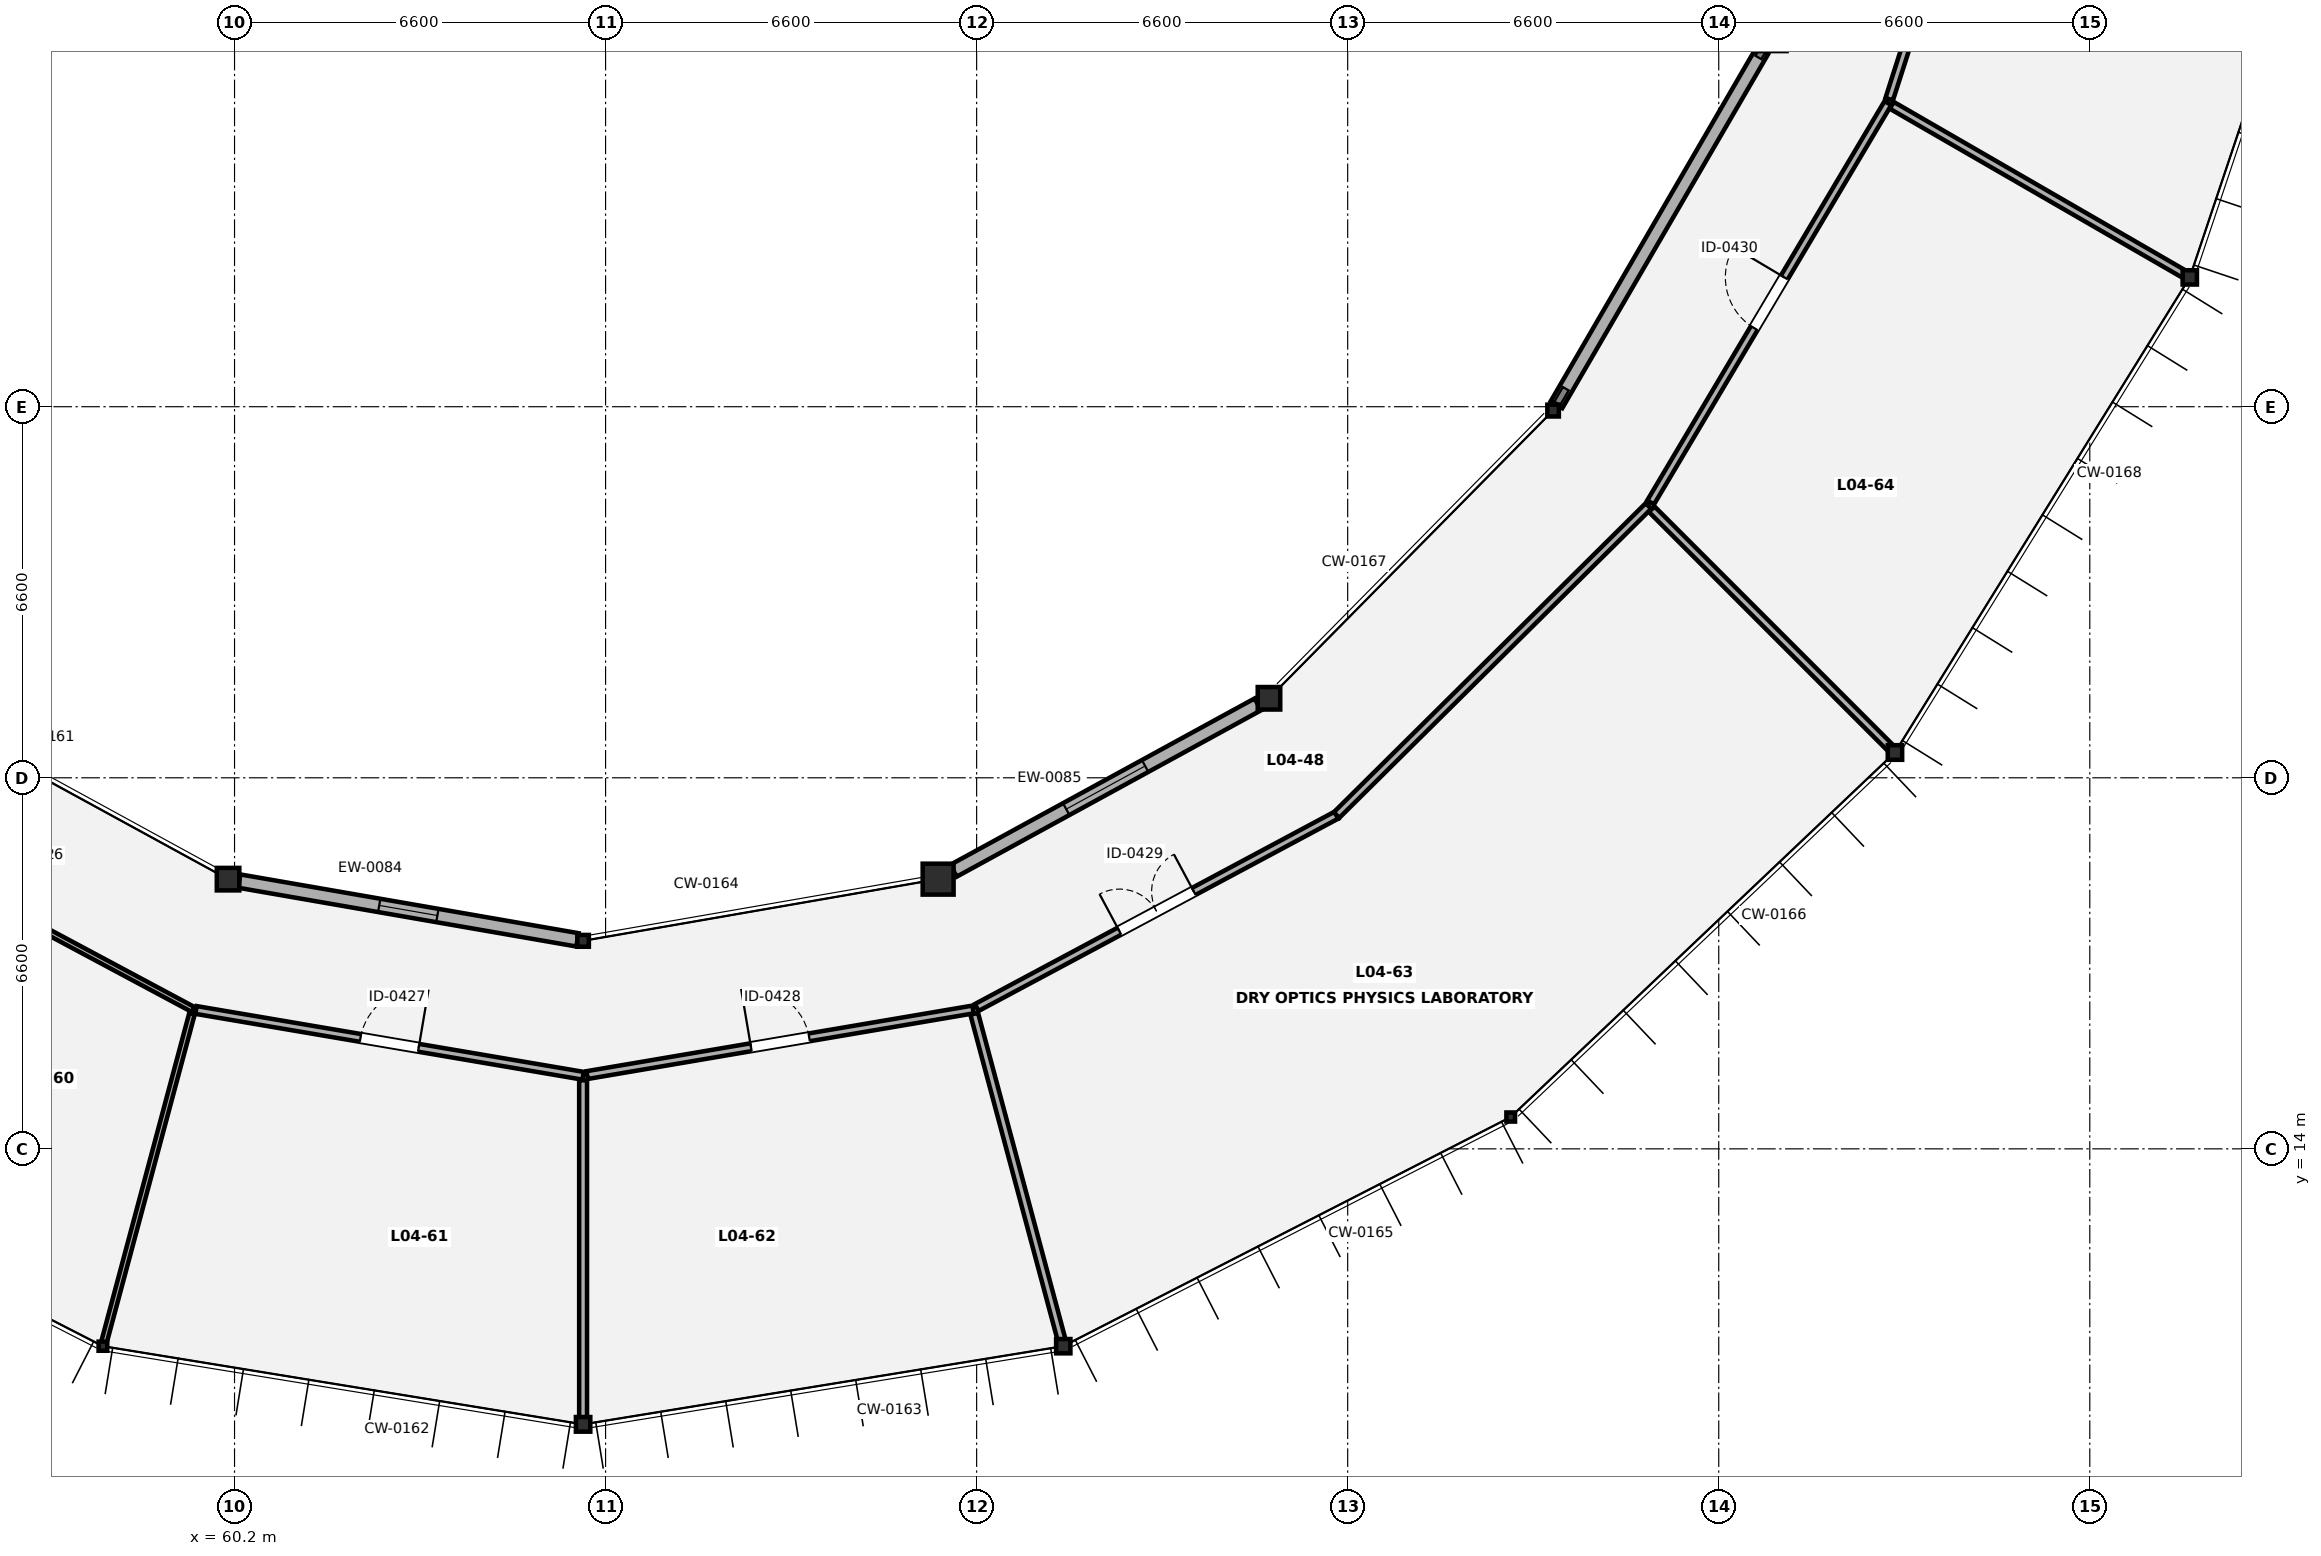
"""IFC4 building model, lengths in metres.
Left out: names, types, materials, properties, quantities, classifications, styles, units other than length and angle.
Written with IfcOpenShell. Run it as: python <this file> out.ifc"""

import sys

from ifc_helpers import new_model, si_unit, direction, frame, frame_2d, origin, origin_2d, place, context, subcontext, project, spatial, rectangle, i_section, extrude, element, fill, save


model = new_model("IFC4")
c1 = context("Model", 3, precision=1e-05, world=origin(), true_north=direction((0.0, 1.0)))
c2 = subcontext(c1, "Body", "Model", "MODEL_VIEW")
j1 = project(units=[si_unit("LENGTHUNIT", "METRE"), si_unit("PLANEANGLEUNIT", "RADIAN")], contexts=[c1])
p1 = place(None, origin())
s1 = spatial("IfcSite", under=j1, at=p1, CompositionType="ELEMENT")
p2 = place(p1, origin())
s2 = spatial("IfcBuilding", under=s1, at=p2, CompositionType="ELEMENT")
p3 = place(p2, frame((0.0, 0.0, 17.5)))
s3 = spatial("IfcBuildingStorey", under=s2, at=p3, CompositionType="ELEMENT", Elevation=17.5)
p4 = place(p3, frame((57.859, 10.49, 0.0), z_axis=(0.0, 0.0, 1.0), x_axis=(1.0, 0.0, 0.0)))
e1 = element("IfcColumn", 1, at=p4, inside=s3, PredefinedType="COLUMN", context=c2, shape_type="SweptSolid", body=[
    extrude(i_section(OverallWidth=0.154, OverallDepth=0.162, WebThickness=0.008, FlangeThickness=0.011, FilletRadius=0.009, at=origin_2d()), origin(), (0.0, 0.0, 1.0), 4.2),
])
p5 = place(p3, frame((60.085, 18.797, 0.0), z_axis=(0.0, 0.0, 1.0), x_axis=(1.0, 0.0, 0.0)))
e2 = element("IfcColumn", 2, at=p5, inside=s3, PredefinedType="PILASTER", context=c2, shape_type="SweptSolid", body=[
    extrude(rectangle(XDim=0.4, YDim=0.4, at=origin_2d()), origin(), (0.0, 0.0, 1.0), 4.2),
])
p6 = place(p3, frame((66.4, 9.1, 0.0), z_axis=(0.0, 0.0, 1.0), x_axis=(1.0, 0.0, 0.0)))
e3 = element("IfcColumn", 3, at=p6, inside=s3, PredefinedType="COLUMN", context=c2, shape_type="SweptSolid", body=[
    extrude(i_section(OverallWidth=0.256, OverallDepth=0.26, WebThickness=0.01, FlangeThickness=0.017, FilletRadius=0.014, at=origin_2d()), origin(), (0.0, 0.0, 1.0), 4.2),
])
p7 = place(p3, frame((66.4, 17.7, 0.0), z_axis=(0.0, 0.0, 1.0), x_axis=(1.0, 0.0, 0.0)))
e4 = element("IfcColumn", 4, at=p7, inside=s3, PredefinedType="COLUMN", context=c2, shape_type="SweptSolid", body=[
    extrude(i_section(OverallWidth=0.205, OverallDepth=0.21, WebThickness=0.009, FlangeThickness=0.014, FilletRadius=0.011, at=origin_2d()), origin(), (0.0, 0.0, 1.0), 4.2),
])
p8 = place(p3, frame((74.941, 10.49, 0.0), z_axis=(0.0, 0.0, 1.0), x_axis=(1.0, 0.0, 0.0)))
e5 = element("IfcColumn", 5, at=p8, inside=s3, PredefinedType="COLUMN", context=c2, shape_type="SweptSolid", body=[
    extrude(i_section(OverallWidth=0.254, OverallDepth=0.254, WebThickness=0.009, FlangeThickness=0.014, FilletRadius=0.014, at=origin_2d()), origin(), (0.0, 0.0, 1.0), 4.2),
])
p9 = place(p3, frame((72.715, 18.797, 0.0), z_axis=(0.0, 0.0, 1.0), x_axis=(1.0, 0.0, 0.0)))
e6 = element("IfcColumn", 6, at=p9, inside=s3, PredefinedType="COLUMN", context=c2, shape_type="SweptSolid", body=[
    extrude(rectangle(XDim=0.55, YDim=0.55, at=origin_2d()), origin(), (0.0, 0.0, 1.0), 4.2),
])
p10 = place(p3, frame((82.9, 14.566, 0.0), z_axis=(0.0, 0.0, 1.0), x_axis=(1.0, 0.0, 0.0)))
e7 = element("IfcColumn", 7, at=p10, inside=s3, PredefinedType="COLUMN", context=c2, shape_type="SweptSolid", body=[
    extrude(i_section(OverallWidth=0.154, OverallDepth=0.162, WebThickness=0.008, FlangeThickness=0.011, FilletRadius=0.009, at=origin_2d()), origin(), (0.0, 0.0, 1.0), 4.2),
])
p11 = place(p3, frame((78.6, 22.014, 0.0), z_axis=(0.0, 0.0, 1.0), x_axis=(1.0, 0.0, 0.0)))
e8 = element("IfcColumn", 8, at=p11, inside=s3, PredefinedType="PILASTER", context=c2, shape_type="SweptSolid", body=[
    extrude(rectangle(XDim=0.4, YDim=0.4, at=origin_2d()), origin(), (0.0, 0.0, 1.0), 4.2),
])
p12 = place(p3, frame((89.735, 21.05, 0.0), z_axis=(0.0, 0.0, 1.0), x_axis=(1.0, 0.0, 0.0)))
e9 = element("IfcColumn", 9, at=p12, inside=s3, PredefinedType="COLUMN", context=c2, shape_type="SweptSolid", body=[
    extrude(i_section(OverallWidth=0.256, OverallDepth=0.26, WebThickness=0.01, FlangeThickness=0.017, FilletRadius=0.014, at=origin_2d()), origin(), (0.0, 0.0, 1.0), 4.2),
])
p13 = place(p3, frame((83.653, 27.131, 0.0), z_axis=(0.0, 0.0, 1.0), x_axis=(1.0, 0.0, 0.0)))
e10 = element("IfcColumn", 10, at=p13, inside=s3, PredefinedType="COLUMN", context=c2, shape_type="SweptSolid", body=[
    extrude(i_section(OverallWidth=0.205, OverallDepth=0.21, WebThickness=0.009, FlangeThickness=0.014, FilletRadius=0.011, at=origin_2d()), origin(), (0.0, 0.0, 1.0), 4.2),
])
p14 = place(p3, frame((94.979, 29.5, 0.0), z_axis=(0.0, 0.0, 1.0), x_axis=(1.0, 0.0, 0.0)))
e11 = element("IfcColumn", 11, at=p14, inside=s3, PredefinedType="COLUMN", context=c2, shape_type="SweptSolid", body=[
    extrude(i_section(OverallWidth=0.254, OverallDepth=0.254, WebThickness=0.009, FlangeThickness=0.014, FilletRadius=0.014, at=origin_2d()), origin(), (0.0, 0.0, 1.0), 4.2),
])
p15 = place(p3, frame((60.283, 18.763, 0.0), z_axis=(0.0, 0.0, 1.0), x_axis=(0.985246064368, -0.171143777706, 0.0)))
e12 = element("IfcWall", 12, at=p15, inside=s3, PredefinedType="SOLIDWALL", context=c2, shape_type="SweptSolid", body=[
    extrude(rectangle(XDim=6.107, YDim=0.24, at=frame_2d((3.053, 0.0))), origin(), (0.0, 0.0, 1.0), 3.65),
])
p16 = place(p15, frame((2.528, 0.0, 0.85)))
e13 = element("IfcOpeningElement", 13, at=p16, cuts=e12, PredefinedType="OPENING", context=c2, shape_type="SweptSolid", body=[
    extrude(rectangle(XDim=1.05, YDim=1.35, at=frame_2d((0.525, 0.675))), frame((0.0, 0.13, 0.0), z_axis=(0.0, -1.0, 0.0), x_axis=(1.0, 0.0, 0.0)), (0.0, 0.0, 1.0), 0.26),
])
p17 = place(p3, frame((72.988, 18.947, 0.0), z_axis=(0.0, 0.0, 1.0), x_axis=(0.877477839064, 0.479617182712, 0.0)))
e14 = element("IfcWall", 14, at=p17, inside=s3, PredefinedType="SOLIDWALL", context=c2, shape_type="SweptSolid", body=[
    extrude(rectangle(XDim=6.169, YDim=0.24, at=frame_2d((3.085, 0.0))), origin(), (0.0, 0.0, 1.0), 3.65),
])
p18 = place(p17, frame((2.285, 0.0, 0.85)))
e15 = element("IfcOpeningElement", 15, at=p18, cuts=e14, PredefinedType="OPENING", context=c2, shape_type="SweptSolid", body=[
    extrude(rectangle(XDim=1.6, YDim=1.5, at=frame_2d((0.8, 0.75))), frame((0.0, 0.13, 0.0), z_axis=(0.0, -1.0, 0.0), x_axis=(1.0, 0.0, 0.0)), (0.0, 0.0, 1.0), 0.26),
])
p19 = place(p3, frame((83.713, 27.235, 0.0), z_axis=(0.0, 0.0, 1.0), x_axis=(0.502677590803, 0.864473967048, 0.0)))
e16 = element("IfcWall", 16, at=p19, inside=s3, PredefinedType="SOLIDWALL", context=c2, shape_type="SweptSolid", body=[
    extrude(rectangle(XDim=7.278, YDim=0.24, at=frame_2d((3.639, 0.0))), origin(), (0.0, 0.0, 1.0), 3.65),
])
p20 = place(p3, frame((53.063, 19.902, 0.0), z_axis=(0.0, 0.0, 1.0), x_axis=(0.881826283139, -0.471574391125, 0.0)))
e17 = element("IfcWall", 17, at=p20, inside=s3, PredefinedType="PARTITIONING", context=c2, shape_type="SweptSolid", body=[
    extrude(rectangle(XDim=7.258, YDim=0.1, at=frame_2d((3.629, 0.0))), origin(), (0.0, 0.0, 1.0), 4.0),
])
p21 = place(p20, frame((3.129, 0.0, 0.0)))
e18 = element("IfcOpeningElement", 18, at=p21, cuts=e17, PredefinedType="OPENING", context=c2, shape_type="SweptSolid", body=[
    extrude(rectangle(XDim=1.0, YDim=2.1, at=frame_2d((0.5, 1.05))), frame((0.0, 0.06, 0.0), z_axis=(0.0, -1.0, 0.0), x_axis=(1.0, 0.0, 0.0)), (0.0, 0.0, 1.0), 0.12),
])
p22 = place(p3, frame((59.443, 16.402, 0.0), z_axis=(0.0, 0.0, 1.0), x_axis=(-0.258805895167, -0.965929349708, 0.0)))
e19 = element("IfcWall", 19, at=p22, inside=s3, PredefinedType="PARTITIONING", context=c2, shape_type="SweptSolid", body=[
    extrude(rectangle(XDim=6.06, YDim=0.1, at=frame_2d((3.03, 0.0))), origin(), (0.0, 0.0, 1.0), 3.323),
])
p23 = place(p3, frame((59.515, 16.47, 0.0), z_axis=(0.0, 0.0, 1.0), x_axis=(0.985861622289, -0.167561516157, 0.0)))
e20 = element("IfcWall", 20, at=p23, inside=s3, PredefinedType="PARTITIONING", context=c2, shape_type="SweptSolid", body=[
    extrude(rectangle(XDim=6.983, YDim=0.14, at=frame_2d((3.492, 0.0))), origin(), (0.0, 0.0, 1.0), 4.0),
])
p24 = place(p23, frame((2.967, 0.0, 0.0)))
e21 = element("IfcOpeningElement", 21, at=p24, cuts=e20, PredefinedType="OPENING", context=c2, shape_type="SweptSolid", body=[
    extrude(rectangle(XDim=1.05, YDim=2.15, at=frame_2d((0.525, 1.075))), frame((0.0, 0.08, 0.0), z_axis=(0.0, -1.0, 0.0), x_axis=(1.0, 0.0, 0.0)), (0.0, 0.0, 1.0), 0.16),
])
p25 = place(p3, frame((66.4, 15.22, 0.0), z_axis=(0.0, 0.0, 1.0), x_axis=(0.0, -1.0, 0.0)))
e22 = element("IfcWall", 22, at=p25, inside=s3, PredefinedType="PARTITIONING", context=c2, shape_type="SweptSolid", body=[
    extrude(rectangle(XDim=6.06, YDim=0.14, at=frame_2d((3.03, 0.0))), origin(), (0.0, 0.0, 1.0), 3.471),
])
p26 = place(p3, frame((66.472, 15.312, 0.0), z_axis=(0.0, 0.0, 1.0), x_axis=(0.985861002198, 0.167565164474, 0.0)))
e23 = element("IfcWall", 23, at=p26, inside=s3, PredefinedType="PARTITIONING", context=c2, shape_type="SweptSolid", body=[
    extrude(rectangle(XDim=6.963, YDim=0.14, at=frame_2d((3.481, 0.0))), origin(), (0.0, 0.0, 1.0), 4.0),
])
p27 = place(p26, frame((2.956, 0.0, 0.0)))
e24 = element("IfcOpeningElement", 24, at=p27, cuts=e23, PredefinedType="OPENING", context=c2, shape_type="SweptSolid", body=[
    extrude(rectangle(XDim=1.05, YDim=2.15, at=frame_2d((0.525, 1.075))), frame((0.0, 0.08, 0.0), z_axis=(0.0, -1.0, 0.0), x_axis=(1.0, 0.0, 0.0)), (0.0, 0.0, 1.0), 0.16),
])
p28 = place(p3, frame((73.357, 16.402, 0.0), z_axis=(0.0, 0.0, 1.0), x_axis=(0.258805895167, -0.965929349708, 0.0)))
e25 = element("IfcWall", 25, at=p28, inside=s3, PredefinedType="PARTITIONING", context=c2, shape_type="SweptSolid", body=[
    extrude(rectangle(XDim=6.06, YDim=0.14, at=frame_2d((3.03, 0.0))), origin(), (0.0, 0.0, 1.0), 3.465),
])
p29 = place(p3, frame((73.402, 16.514, 0.0), z_axis=(0.0, 0.0, 1.0), x_axis=(0.881829873621, 0.471567676999, 0.0)))
e26 = element("IfcWall", 26, at=p29, inside=s3, PredefinedType="PARTITIONING", context=c2, shape_type="SweptSolid", body=[
    extrude(rectangle(XDim=7.256, YDim=0.14, at=frame_2d((3.628, 0.0))), origin(), (0.0, 0.0, 1.0), 4.0),
])
p30 = place(p29, frame((2.878, 0.0, 0.0)))
e27 = element("IfcOpeningElement", 27, at=p30, cuts=e26, PredefinedType="OPENING", context=c2, shape_type="SweptSolid", body=[
    extrude(rectangle(XDim=1.5, YDim=2.15, at=frame_2d((0.75, 1.075))), frame((0.0, 0.08, 0.0), z_axis=(0.0, -1.0, 0.0), x_axis=(1.0, 0.0, 0.0)), (0.0, 0.0, 1.0), 0.16),
])
p31 = place(p3, frame((79.802, 19.937, 0.0), z_axis=(0.0, 0.0, 1.0), x_axis=(0.710427757183, 0.703770134222, 0.0)))
e28 = element("IfcWall", 28, at=p31, inside=s3, PredefinedType="PARTITIONING", context=c2, shape_type="SweptSolid", body=[
    extrude(rectangle(XDim=7.811, YDim=0.14, at=frame_2d((3.905, 0.0))), origin(), (0.0, 0.0, 1.0), 4.0),
])
p32 = place(p3, frame((85.407, 25.377, 0.0), z_axis=(0.0, 0.0, 1.0), x_axis=(0.707106781187, -0.707106781187, 0.0)))
e29 = element("IfcWall", 29, at=p32, inside=s3, PredefinedType="PARTITIONING", context=c2, shape_type="SweptSolid", body=[
    extrude(rectangle(XDim=6.06, YDim=0.14, at=frame_2d((3.03, 0.0))), origin(), (0.0, 0.0, 1.0), 3.323),
])
p33 = place(p3, frame((85.388, 25.498, 0.0), z_axis=(0.0, 0.0, 1.0), x_axis=(0.510914893672, 0.8596312997, 0.0)))
e30 = element("IfcWall", 30, at=p33, inside=s3, PredefinedType="PARTITIONING", context=c2, shape_type="SweptSolid", body=[
    extrude(rectangle(XDim=8.262, YDim=0.14, at=frame_2d((4.131, 0.0))), origin(), (0.0, 0.0, 1.0), 4.0),
])
p34 = place(p33, frame((3.606, 0.0, 0.0)))
e31 = element("IfcOpeningElement", 31, at=p34, cuts=e30, PredefinedType="OPENING", context=c2, shape_type="SweptSolid", body=[
    extrude(rectangle(XDim=1.05, YDim=2.15, at=frame_2d((0.525, 1.075))), frame((0.0, 0.08, 0.0), z_axis=(0.0, -1.0, 0.0), x_axis=(1.0, 0.0, 0.0)), (0.0, 0.0, 1.0), 0.16),
])
p35 = place(p3, frame((89.679, 32.56, 0.0), z_axis=(0.0, 0.0, 1.0), x_axis=(0.866020543329, -0.500008418462, 0.0)))
e32 = element("IfcWall", 32, at=p35, inside=s3, PredefinedType="PARTITIONING", context=c2, shape_type="SweptSolid", body=[
    extrude(rectangle(XDim=6.06, YDim=0.14, at=frame_2d((3.03, 0.0))), origin(), (0.0, 0.0, 1.0), 3.471),
])
p36 = place(p3, frame((89.632, 32.67, 0.0), z_axis=(0.0, 0.0, 1.0), x_axis=(0.305495322231, 0.952193577008, 0.0)))
e33 = element("IfcWall", 33, at=p36, inside=s3, PredefinedType="PARTITIONING", context=c2, shape_type="SweptSolid", body=[
    extrude(rectangle(XDim=8.69, YDim=0.14, at=frame_2d((4.345, 0.0))), origin(), (0.0, 0.0, 1.0), 4.0),
])
p37 = place(p36, frame((3.82, 0.0, 0.0)))
e34 = element("IfcOpeningElement", 34, at=p37, cuts=e33, PredefinedType="OPENING", context=c2, shape_type="SweptSolid", body=[
    extrude(rectangle(XDim=1.05, YDim=2.15, at=frame_2d((0.525, 1.075))), frame((0.0, 0.08, 0.0), z_axis=(0.0, -1.0, 0.0), x_axis=(1.0, 0.0, 0.0)), (0.0, 0.0, 1.0), 0.16),
])
p38 = place(p16, origin())
e35 = element("IfcWindow", 35, at=p38, inside=s3, PartitioningType="SINGLE_PANEL", PredefinedType="WINDOW", context=c2, shape_type="SweptSolid", body=[
    extrude(rectangle(XDim=1.05, YDim=1.35, at=frame_2d((0.525, 0.675))), frame((0.0, 0.03, 0.0), z_axis=(0.0, -1.0, 0.0), x_axis=(1.0, 0.0, 0.0)), (0.0, 0.0, 1.0), 0.06),
])
fill(e13, e35)
p39 = place(p18, origin())
e36 = element("IfcWindow", 36, at=p39, inside=s3, PartitioningType="SINGLE_PANEL", PredefinedType="WINDOW", context=c2, shape_type="SweptSolid", body=[
    extrude(rectangle(XDim=1.6, YDim=1.5, at=frame_2d((0.8, 0.75))), frame((0.0, 0.03, 0.0), z_axis=(0.0, -1.0, 0.0), x_axis=(1.0, 0.0, 0.0)), (0.0, 0.0, 1.0), 0.06),
])
fill(e15, e36)
p40 = place(p24, origin())
e37 = element("IfcDoor", 37, at=p40, inside=s3, OperationType="SINGLE_SWING_RIGHT", PredefinedType="DOOR", context=c2, shape_type="SweptSolid", body=[
    extrude(rectangle(XDim=1.05, YDim=2.15, at=frame_2d((0.525, 1.075))), frame((0.0, 0.025, 0.0), z_axis=(0.0, -1.0, 0.0), x_axis=(1.0, 0.0, 0.0)), (0.0, 0.0, 1.0), 0.05),
])
fill(e21, e37)
p41 = place(p27, origin())
e38 = element("IfcDoor", 38, at=p41, inside=s3, OperationType="SINGLE_SWING_LEFT", PredefinedType="DOOR", context=c2, shape_type="SweptSolid", body=[
    extrude(rectangle(XDim=1.05, YDim=2.15, at=frame_2d((0.525, 1.075))), frame((0.0, 0.025, 0.0), z_axis=(0.0, -1.0, 0.0), x_axis=(1.0, 0.0, 0.0)), (0.0, 0.0, 1.0), 0.05),
])
fill(e24, e38)
p42 = place(p30, origin())
e39 = element("IfcDoor", 39, at=p42, inside=s3, OperationType="DOUBLE_DOOR_SINGLE_SWING", PredefinedType="DOOR", context=c2, shape_type="SweptSolid", body=[
    extrude(rectangle(XDim=1.5, YDim=2.15, at=frame_2d((0.75, 1.075))), frame((0.0, 0.025, 0.0), z_axis=(0.0, -1.0, 0.0), x_axis=(1.0, 0.0, 0.0)), (0.0, 0.0, 1.0), 0.05),
])
fill(e27, e39)
p43 = place(p34, origin())
e40 = element("IfcDoor", 40, at=p43, inside=s3, OperationType="SINGLE_SWING_RIGHT", PredefinedType="DOOR", context=c2, shape_type="SweptSolid", body=[
    extrude(rectangle(XDim=1.05, YDim=2.15, at=frame_2d((0.525, 1.075))), frame((0.0, 0.025, 0.0), z_axis=(0.0, -1.0, 0.0), x_axis=(1.0, 0.0, 0.0)), (0.0, 0.0, 1.0), 0.05),
])
fill(e31, e40)
save(model, sys.argv[1])
